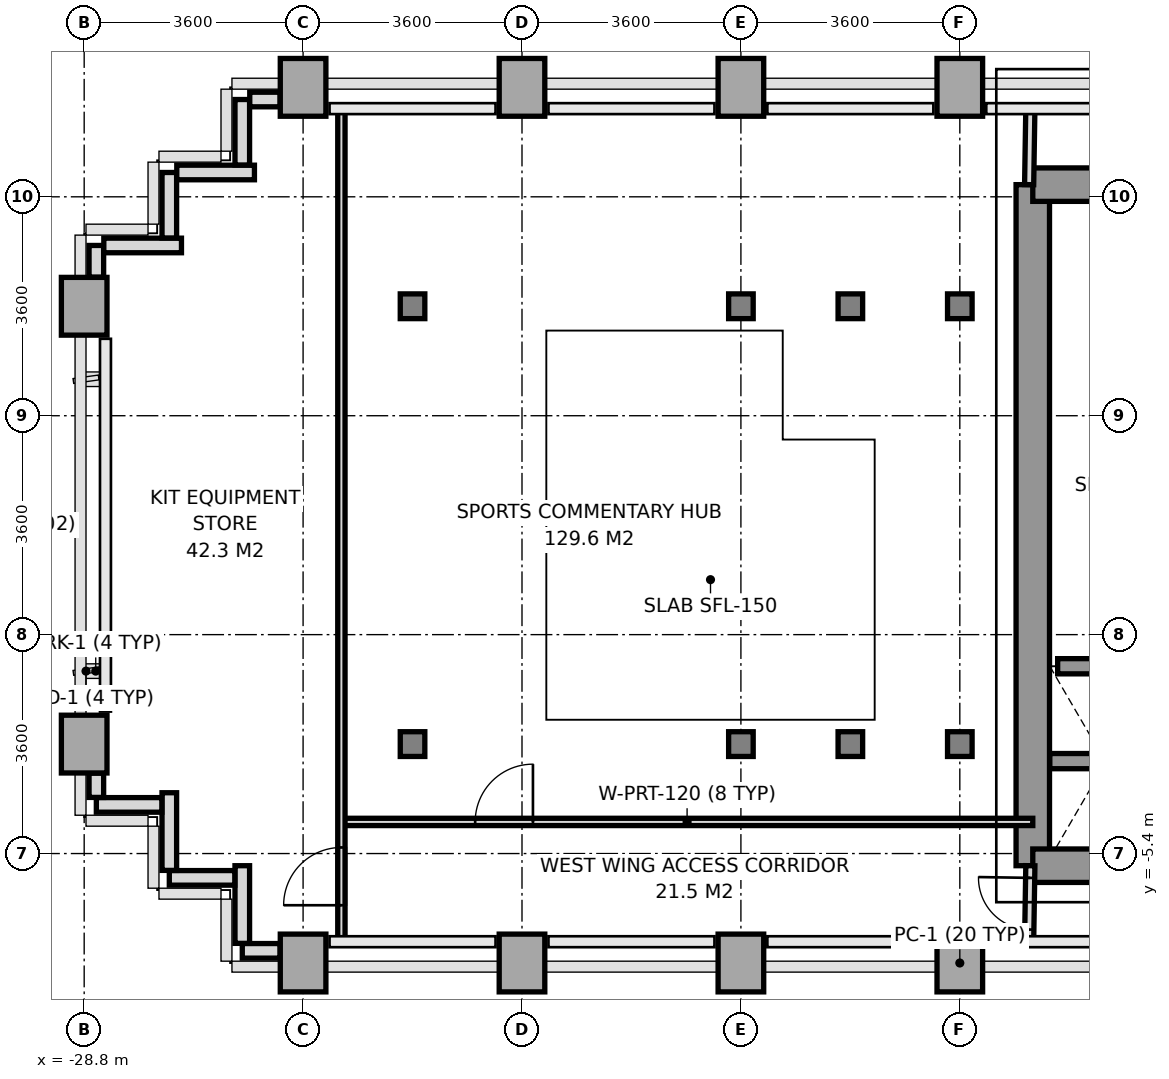
"""IFC4 building model, lengths in metres.
Left out: names, types, materials, properties, quantities, classifications, styles, units other than length and angle.
Written with IfcOpenShell. Run it as: python <this file> out.ifc"""

import sys

from ifc_helpers import new_model, si_unit, direction, frame, frame_2d, origin, origin_2d, place, context, subcontext, project, spatial, rectangle, i_section, extrude, source, transform, mapped, element, fill, save


model = new_model("IFC4")
c1 = context("Model", 3, precision=1e-05, world=origin(), true_north=direction((0.0, 1.0)))
c2 = subcontext(c1, "Body", "Model", "MODEL_VIEW")
j1 = project(units=[si_unit("LENGTHUNIT", "METRE"), si_unit("PLANEANGLEUNIT", "RADIAN")], contexts=[c1])
p1 = place(None, origin())
s1 = spatial("IfcSite", under=j1, at=p1, CompositionType="ELEMENT")
p2 = place(p1, origin())
s2 = spatial("IfcBuilding", under=s1, at=p2, CompositionType="ELEMENT")
p3 = place(p2, frame((0.0, 0.0, 71.4)))
s3 = spatial("IfcBuildingStorey", under=s2, at=p3, CompositionType="ELEMENT", Elevation=71.4)
m1 = source(origin(), c2, "Body", "SweptSolid", [
    extrude(rectangle(XDim=0.75, YDim=0.95, at=origin_2d()), origin(), (0.0, 0.0, 1.0), 3.2),
])
for number, where, z_axis, x_axis in (
    (1, (-28.8, -3.6, 0.0), (0.0, 0.0, 1.0), (1.0, 0.0, 0.0)),
    (2, (-28.8, 3.6, 0.0), (0.0, 0.0, 1.0), (1.0, 0.0, 0.0)),
    (3, (-25.2, -7.2, 0.0), (0.0, 0.0, 1.0), (1.0, 0.0, 0.0)),
    (4, (-25.2, 7.2, 0.0), (0.0, 0.0, 1.0), (1.0, 0.0, 0.0)),
):
    element("IfcColumn", number, at=place(p3, frame(where, z_axis=z_axis, x_axis=x_axis)), inside=s3, PredefinedType="COLUMN", context=c2, shape_type="MappedRepresentation", body=[
        mapped(m1, transform((0.0, 0.0, 0.0), x_axis=(1.0, 0.0, 0.0), y_axis=(0.0, 1.0, 0.0), z_axis=(0.0, 0.0, 1.0), scale=1.0)),
    ])
m2 = source(origin(), c2, "Body", "SweptSolid", [
    extrude(i_section(OverallWidth=0.404, OverallDepth=0.407, WebThickness=0.022, FlangeThickness=0.035, at=origin_2d()), origin(), (0.0, 0.0, 1.0), 3.2),
])
for number, where, z_axis, x_axis in (
    (5, (-23.4, -3.6, 0.0), (0.0, 0.0, 1.0), (1.0, 0.0, 0.0)),
    (6, (-23.4, 3.6, 0.0), (0.0, 0.0, 1.0), (1.0, 0.0, 0.0)),
):
    element("IfcColumn", number, at=place(p3, frame(where, z_axis=z_axis, x_axis=x_axis)), inside=s3, PredefinedType="COLUMN", context=c2, shape_type="MappedRepresentation", body=[
        mapped(m2, transform((0.0, 0.0, 0.0), x_axis=(1.0, 0.0, 0.0), y_axis=(0.0, 1.0, 0.0), z_axis=(0.0, 0.0, 1.0), scale=1.0)),
    ])
for number, where, z_axis, x_axis in (
    (7, (-21.6, -7.2, 0.0), (0.0, 0.0, 1.0), (1.0, 0.0, 0.0)),
    (8, (-21.6, 7.2, 0.0), (0.0, 0.0, 1.0), (1.0, 0.0, 0.0)),
    (9, (-18.0, -7.2, 0.0), (0.0, 0.0, 1.0), (1.0, 0.0, 0.0)),
):
    element("IfcColumn", number, at=place(p3, frame(where, z_axis=z_axis, x_axis=x_axis)), inside=s3, PredefinedType="COLUMN", context=c2, shape_type="MappedRepresentation", body=[
        mapped(m1, transform((0.0, 0.0, 0.0), x_axis=(1.0, 0.0, 0.0), y_axis=(0.0, 1.0, 0.0), z_axis=(0.0, 0.0, 1.0), scale=1.0)),
    ])
for number, where, z_axis, x_axis in (
    (10, (-18.0, -3.6, 0.0), (0.0, 0.0, 1.0), (1.0, 0.0, 0.0)),
    (11, (-18.0, 3.6, 0.0), (0.0, 0.0, 1.0), (1.0, 0.0, 0.0)),
):
    element("IfcColumn", number, at=place(p3, frame(where, z_axis=z_axis, x_axis=x_axis)), inside=s3, PredefinedType="COLUMN", context=c2, shape_type="MappedRepresentation", body=[
        mapped(m2, transform((0.0, 0.0, 0.0), x_axis=(1.0, 0.0, 0.0), y_axis=(0.0, 1.0, 0.0), z_axis=(0.0, 0.0, 1.0), scale=1.0)),
    ])
p4 = place(p3, frame((-18.0, 7.2, 0.0), z_axis=(0.0, 0.0, 1.0), x_axis=(1.0, 0.0, 0.0)))
e12 = element("IfcColumn", 12, at=p4, inside=s3, PredefinedType="COLUMN", context=c2, shape_type="MappedRepresentation", body=[
    mapped(m1, transform((0.0, 0.0, 0.0), x_axis=(1.0, 0.0, 0.0), y_axis=(0.0, 1.0, 0.0), z_axis=(0.0, 0.0, 1.0), scale=1.0)),
])
for number, where, z_axis, x_axis in (
    (13, (-16.2, -3.6, 0.0), (0.0, 0.0, 1.0), (1.0, 0.0, 0.0)),
    (14, (-16.2, 3.6, 0.0), (0.0, 0.0, 1.0), (1.0, 0.0, 0.0)),
):
    element("IfcColumn", number, at=place(p3, frame(where, z_axis=z_axis, x_axis=x_axis)), inside=s3, PredefinedType="COLUMN", context=c2, shape_type="MappedRepresentation", body=[
        mapped(m2, transform((0.0, 0.0, 0.0), x_axis=(1.0, 0.0, 0.0), y_axis=(0.0, 1.0, 0.0), z_axis=(0.0, 0.0, 1.0), scale=1.0)),
    ])
p5 = place(p3, frame((-14.4, -7.2, 0.0), z_axis=(0.0, 0.0, 1.0), x_axis=(1.0, 0.0, 0.0)))
e15 = element("IfcColumn", 15, at=p5, inside=s3, PredefinedType="COLUMN", context=c2, shape_type="MappedRepresentation", body=[
    mapped(m1, transform((0.0, 0.0, 0.0), x_axis=(1.0, 0.0, 0.0), y_axis=(0.0, 1.0, 0.0), z_axis=(0.0, 0.0, 1.0), scale=1.0)),
])
for number, where, z_axis, x_axis in (
    (16, (-14.4, -3.6, 0.0), (0.0, 0.0, 1.0), (1.0, 0.0, 0.0)),
    (17, (-14.4, 3.6, 0.0), (0.0, 0.0, 1.0), (1.0, 0.0, 0.0)),
):
    element("IfcColumn", number, at=place(p3, frame(where, z_axis=z_axis, x_axis=x_axis)), inside=s3, PredefinedType="COLUMN", context=c2, shape_type="MappedRepresentation", body=[
        mapped(m2, transform((0.0, 0.0, 0.0), x_axis=(1.0, 0.0, 0.0), y_axis=(0.0, 1.0, 0.0), z_axis=(0.0, 0.0, 1.0), scale=1.0)),
    ])
p6 = place(p3, frame((-14.4, 7.2, 0.0), z_axis=(0.0, 0.0, 1.0), x_axis=(1.0, 0.0, 0.0)))
e18 = element("IfcColumn", 18, at=p6, inside=s3, PredefinedType="COLUMN", context=c2, shape_type="MappedRepresentation", body=[
    mapped(m1, transform((0.0, 0.0, 0.0), x_axis=(1.0, 0.0, 0.0), y_axis=(0.0, 1.0, 0.0), z_axis=(0.0, 0.0, 1.0), scale=1.0)),
])
p7 = place(p3, frame((-25.578, -7.0, 0.0), z_axis=(0.0, 0.0, 1.0), x_axis=(-1.0, 0.0, 0.0)))
e19 = element("IfcWall", 19, at=p7, inside=s3, PredefinedType="PARAPET", context=c2, shape_type="SweptSolid", body=[
    extrude(rectangle(XDim=0.622, YDim=0.24, at=frame_2d((0.311, 0.0))), origin(), (0.0, 0.0, 1.0), 1.15),
])
p8 = place(p3, frame((-26.2, -6.877, 0.0), z_axis=(0.0, 0.0, 1.0), x_axis=(0.0, 1.0, 0.0)))
e20 = element("IfcWall", 20, at=p8, inside=s3, PredefinedType="PARAPET", context=c2, shape_type="SweptSolid", body=[
    extrude(rectangle(XDim=1.277, YDim=0.24, at=frame_2d((0.638, 0.0))), origin(), (0.0, 0.0, 1.0), 1.15),
])
p9 = place(p3, frame((-26.323, -5.8, 0.0), z_axis=(0.0, 0.0, 1.0), x_axis=(-1.0, 0.0, 0.0)))
e21 = element("IfcWall", 21, at=p9, inside=s3, PredefinedType="PARAPET", context=c2, shape_type="SweptSolid", body=[
    extrude(rectangle(XDim=1.077, YDim=0.24, at=frame_2d((0.539, 0.0))), origin(), (0.0, 0.0, 1.0), 1.15),
])
p10 = place(p3, frame((-27.4, -5.677, 0.0), z_axis=(0.0, 0.0, 1.0), x_axis=(0.0, 1.0, 0.0)))
e22 = element("IfcWall", 22, at=p10, inside=s3, PredefinedType="PARAPET", context=c2, shape_type="SweptSolid", body=[
    extrude(rectangle(XDim=1.277, YDim=0.24, at=frame_2d((0.639, 0.0))), origin(), (0.0, 0.0, 1.0), 1.15),
])
p11 = place(p3, frame((-27.523, -4.6, 0.0), z_axis=(0.0, 0.0, 1.0), x_axis=(-1.0, 0.0, 0.0)))
e23 = element("IfcWall", 23, at=p11, inside=s3, PredefinedType="PARAPET", context=c2, shape_type="SweptSolid", body=[
    extrude(rectangle(XDim=1.077, YDim=0.24, at=frame_2d((0.539, 0.0))), origin(), (0.0, 0.0, 1.0), 1.15),
])
p12 = place(p3, frame((-28.6, -4.477, 0.0), z_axis=(0.0, 0.0, 1.0), x_axis=(0.0, 1.0, 0.0)))
e24 = element("IfcWall", 24, at=p12, inside=s3, PredefinedType="PARAPET", context=c2, shape_type="SweptSolid", body=[
    extrude(rectangle(XDim=0.399, YDim=0.24, at=frame_2d((0.2, 0.0))), origin(), (0.0, 0.0, 1.0), 1.15),
])
p13 = place(p3, frame((-28.6, 4.078, 0.0), z_axis=(0.0, 0.0, 1.0), x_axis=(0.0, 1.0, 0.0)))
e25 = element("IfcWall", 25, at=p13, inside=s3, PredefinedType="PARAPET", context=c2, shape_type="SweptSolid", body=[
    extrude(rectangle(XDim=0.522, YDim=0.24, at=frame_2d((0.261, 0.0))), origin(), (0.0, 0.0, 1.0), 1.15),
])
p14 = place(p3, frame((-28.477, 4.6, 0.0), z_axis=(0.0, 0.0, 1.0), x_axis=(1.0, 0.0, 0.0)))
e26 = element("IfcWall", 26, at=p14, inside=s3, PredefinedType="PARAPET", context=c2, shape_type="SweptSolid", body=[
    extrude(rectangle(XDim=1.277, YDim=0.24, at=frame_2d((0.639, 0.0))), origin(), (0.0, 0.0, 1.0), 1.15),
])
p15 = place(p3, frame((-27.4, 4.723, 0.0), z_axis=(0.0, 0.0, 1.0), x_axis=(0.0, 1.0, 0.0)))
e27 = element("IfcWall", 27, at=p15, inside=s3, PredefinedType="PARAPET", context=c2, shape_type="SweptSolid", body=[
    extrude(rectangle(XDim=1.077, YDim=0.24, at=frame_2d((0.539, 0.0))), origin(), (0.0, 0.0, 1.0), 1.15),
])
p16 = place(p3, frame((-27.277, 5.8, 0.0), z_axis=(0.0, 0.0, 1.0), x_axis=(1.0, 0.0, 0.0)))
e28 = element("IfcWall", 28, at=p16, inside=s3, PredefinedType="PARAPET", context=c2, shape_type="SweptSolid", body=[
    extrude(rectangle(XDim=1.277, YDim=0.24, at=frame_2d((0.639, 0.0))), origin(), (0.0, 0.0, 1.0), 1.15),
])
p17 = place(p3, frame((-26.2, 5.923, 0.0), z_axis=(0.0, 0.0, 1.0), x_axis=(0.0, 1.0, 0.0)))
e29 = element("IfcWall", 29, at=p17, inside=s3, PredefinedType="PARAPET", context=c2, shape_type="SweptSolid", body=[
    extrude(rectangle(XDim=1.077, YDim=0.24, at=frame_2d((0.539, 0.0))), origin(), (0.0, 0.0, 1.0), 1.15),
])
p18 = place(p3, frame((-26.077, 7.0, 0.0), z_axis=(0.0, 0.0, 1.0), x_axis=(1.0, 0.0, 0.0)))
e30 = element("IfcWall", 30, at=p18, inside=s3, PredefinedType="PARAPET", context=c2, shape_type="SweptSolid", body=[
    extrude(rectangle(XDim=0.499, YDim=0.24, at=frame_2d((0.25, 0.0))), origin(), (0.0, 0.0, 1.0), 1.15),
])
p19 = place(p3, frame((-13.2, -5.6, 0.0), z_axis=(0.0, 0.0, 1.0), x_axis=(0.0, 1.0, 0.0)))
e31 = element("IfcWall", 31, at=p19, inside=s3, PredefinedType="SHEAR", context=c2, shape_type="SweptSolid", body=[
    extrude(rectangle(XDim=11.2, YDim=0.55, at=frame_2d((5.6, 0.0))), origin(), (0.0, 0.0, 1.0), 3.2),
])
p20 = place(p3, frame((-13.2, 5.6, 0.0), z_axis=(0.0, 0.0, 1.0), x_axis=(1.0, 0.0, 0.0)))
e32 = element("IfcWall", 32, at=p20, inside=s3, PredefinedType="SHEAR", context=c2, shape_type="SweptSolid", body=[
    extrude(rectangle(XDim=1.819, YDim=0.55, at=frame_2d((0.909, 0.0))), origin(), (0.0, 0.0, 1.0), 3.2),
])
p21 = place(p3, frame((-13.2, -5.6, 0.0), z_axis=(0.0, 0.0, 1.0), x_axis=(1.0, 0.0, 0.0)))
e33 = element("IfcWall", 33, at=p21, inside=s3, PredefinedType="SHEAR", context=c2, shape_type="SweptSolid", body=[
    extrude(rectangle(XDim=7.8, YDim=0.55, at=frame_2d((3.9, 0.0))), origin(), (0.0, 0.0, 1.0), 3.2),
])
p22 = place(p21, frame((3.6, 0.0, 0.0)))
e34 = element("IfcOpeningElement", 34, at=p22, cuts=e33, PredefinedType="OPENING", context=c2, shape_type="SweptSolid", body=[
    extrude(rectangle(XDim=1.2, YDim=2.2, at=frame_2d((0.6, 1.1))), frame((0.0, 0.285, 0.0), z_axis=(0.0, -1.0, 0.0), x_axis=(1.0, 0.0, 0.0)), (0.0, 0.0, 1.0), 0.57),
])
p23 = place(p3, frame((-12.92, -3.88, 0.0), z_axis=(0.0, 0.0, 1.0), x_axis=(1.0, 0.0, 0.0)))
e35 = element("IfcWall", 35, at=p23, inside=s3, PredefinedType="SOLIDWALL", context=c2, shape_type="SweptSolid", body=[
    extrude(rectangle(XDim=1.84, YDim=0.25, at=frame_2d((0.92, 0.0))), origin(), (0.0, 0.0, 1.0), 3.2),
])
p24 = place(p3, frame((-12.791, -2.32, 0.0), z_axis=(0.0, 0.0, 1.0), x_axis=(1.0, 0.0, 0.0)))
e36 = element("IfcWall", 36, at=p24, inside=s3, PredefinedType="SOLIDWALL", context=c2, shape_type="SweptSolid", body=[
    extrude(rectangle(XDim=1.582, YDim=0.25, at=frame_2d((0.791, 0.0))), origin(), (0.0, 0.0, 1.0), 3.2),
])
p25 = place(p3, frame((-13.26, 5.6, 0.0), z_axis=(0.0, 0.0, 1.0), x_axis=(0.016013571389, 0.999871774545, 0.0)))
e37 = element("IfcWall", 37, at=p25, inside=s3, PredefinedType="PARTITIONING", context=c2, shape_type="SweptSolid", body=[
    extrude(rectangle(XDim=1.25, YDim=0.15, at=frame_2d((0.625, 0.0))), origin(), (0.0, 0.0, 1.0), 3.2),
])
p26 = place(p3, frame((-13.26, -6.85, 0.0), z_axis=(0.0, 0.0, 1.0), x_axis=(0.016013571389, 0.999871774545, 0.0)))
e38 = element("IfcWall", 38, at=p26, inside=s3, PredefinedType="PARTITIONING", context=c2, shape_type="SweptSolid", body=[
    extrude(rectangle(XDim=1.25, YDim=0.15, at=frame_2d((0.625, 0.0))), origin(), (0.0, 0.0, 1.0), 3.2),
])
p27 = place(p26, frame((0.2, 0.0, 0.0)))
e39 = element("IfcOpeningElement", 39, at=p27, cuts=e38, PredefinedType="OPENING", context=c2, shape_type="SweptSolid", body=[
    extrude(rectangle(XDim=0.85, YDim=2.1, at=frame_2d((0.425, 1.05))), frame((0.0, 0.085, 0.0), z_axis=(0.0, -1.0, 0.0), x_axis=(1.0, 0.0, 0.0)), (0.0, 0.0, 1.0), 0.17),
])
p28 = place(p3, frame((-24.57, -4.88, 0.0), z_axis=(0.0, 0.0, 1.0), x_axis=(1.0, 0.0, 0.0)))
e40 = element("IfcWall", 40, at=p28, inside=s3, PredefinedType="PARTITIONING", context=c2, shape_type="SweptSolid", body=[
    extrude(rectangle(XDim=11.37, YDim=0.12, at=frame_2d((5.685, 0.0))), origin(), (0.0, 0.0, 1.0), 2.7),
])
p29 = place(p28, frame((2.2, 0.0, 0.0)))
e41 = element("IfcOpeningElement", 41, at=p29, cuts=e40, PredefinedType="OPENING", context=c2, shape_type="SweptSolid", body=[
    extrude(rectangle(XDim=0.95, YDim=2.15, at=frame_2d((0.475, 1.075))), frame((0.0, 0.07, 0.0), z_axis=(0.0, -1.0, 0.0), x_axis=(1.0, 0.0, 0.0)), (0.0, 0.0, 1.0), 0.14),
])
p30 = place(p3, frame((-24.57, -6.85, 0.0), z_axis=(0.0, 0.0, 1.0), x_axis=(0.0, 1.0, 0.0)))
e42 = element("IfcWall", 42, at=p30, inside=s3, PredefinedType="PARTITIONING", context=c2, shape_type="SweptSolid", body=[
    extrude(rectangle(XDim=13.7, YDim=0.12, at=frame_2d((6.85, 0.0))), origin(), (0.0, 0.0, 1.0), 2.65),
])
p31 = place(p30, frame((0.6, 0.0, 0.0)))
e43 = element("IfcOpeningElement", 43, at=p31, cuts=e42, PredefinedType="OPENING", context=c2, shape_type="SweptSolid", body=[
    extrude(rectangle(XDim=0.95, YDim=2.15, at=frame_2d((0.475, 1.075))), frame((0.0, 0.07, 0.0), z_axis=(0.0, -1.0, 0.0), x_axis=(1.0, 0.0, 0.0)), (0.0, 0.0, 1.0), 0.14),
])
m3 = source(origin(), c2, "Body", "SweptSolid", [
    extrude(rectangle(XDim=0.95, YDim=2.15, at=frame_2d((0.475, 1.075))), frame((0.0, 0.025, 0.0), z_axis=(0.0, -1.0, 0.0), x_axis=(1.0, 0.0, 0.0)), (0.0, 0.0, 1.0), 0.05),
])
p32 = place(p29, origin())
e44 = element("IfcDoor", 44, at=p32, inside=s3, OperationType="SINGLE_SWING_RIGHT", PredefinedType="DOOR", context=c2, shape_type="MappedRepresentation", body=[
    mapped(m3, transform((0.0, 0.0, 0.0), x_axis=(1.0, 0.0, 0.0), y_axis=(0.0, 1.0, 0.0), z_axis=(0.0, 0.0, 1.0), scale=1.0)),
])
fill(e41, e44)
p33 = place(p31, origin())
e45 = element("IfcDoor", 45, at=p33, inside=s3, OperationType="SINGLE_SWING_LEFT", PredefinedType="DOOR", context=c2, shape_type="MappedRepresentation", body=[
    mapped(m3, transform((0.0, 0.0, 0.0), x_axis=(1.0, 0.0, 0.0), y_axis=(0.0, 1.0, 0.0), z_axis=(0.0, 0.0, 1.0), scale=1.0)),
])
fill(e43, e45)
m4 = source(origin(), c2, "Body", "SweptSolid", [
    extrude(rectangle(XDim=0.85, YDim=2.1, at=frame_2d((0.425, 1.05))), frame((0.0, 0.025, 0.0), z_axis=(0.0, -1.0, 0.0), x_axis=(1.0, 0.0, 0.0)), (0.0, 0.0, 1.0), 0.05),
])
p34 = place(p27, origin())
e46 = element("IfcDoor", 46, at=p34, inside=s3, OperationType="SINGLE_SWING_RIGHT", PredefinedType="DOOR", context=c2, shape_type="MappedRepresentation", body=[
    mapped(m4, transform((0.0, 0.0, 0.0), x_axis=(1.0, 0.0, 0.0), y_axis=(0.0, 1.0, 0.0), z_axis=(0.0, 0.0, 1.0), scale=1.0)),
])
fill(e39, e46)
save(model, sys.argv[1])
